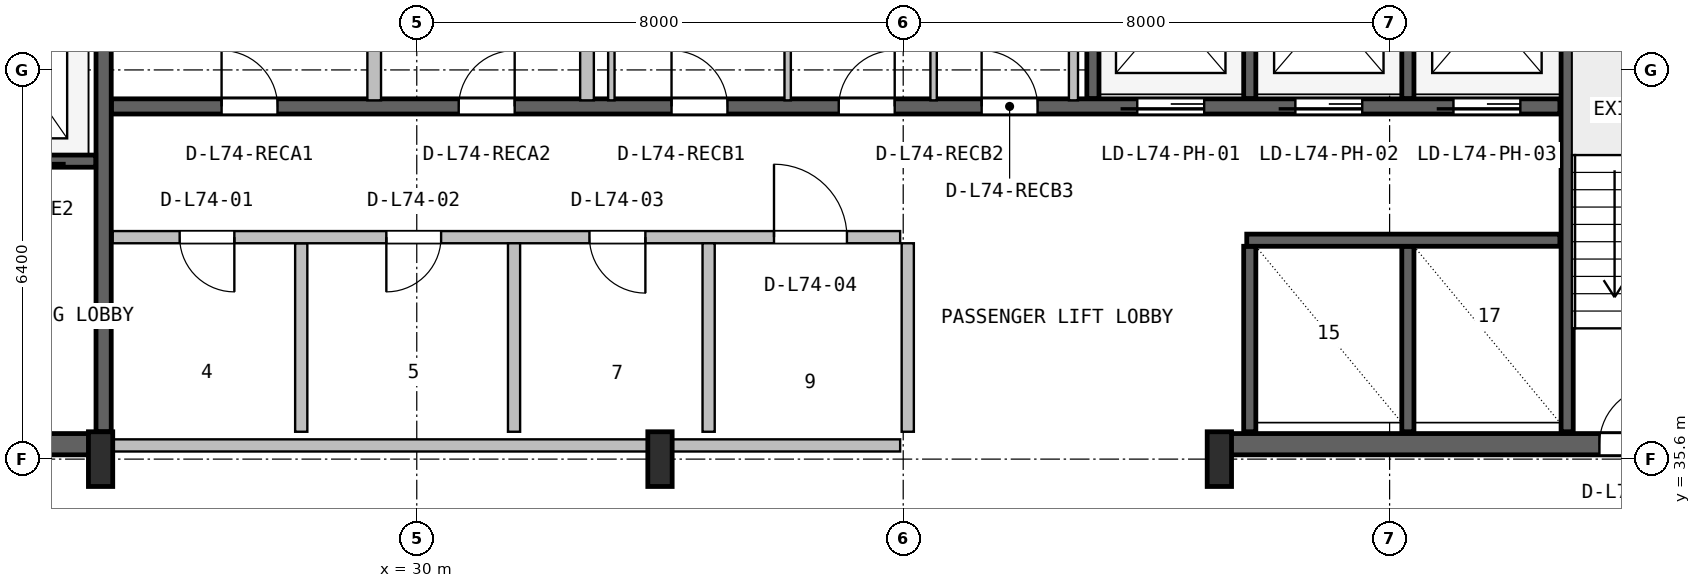
"""IFC4 building model, lengths in metres.
Left out: names, types, materials, properties, quantities, classifications, styles, units other than length and angle.
Written with IfcOpenShell. Run it as: python <this file> out.ifc"""

import sys

from ifc_helpers import new_model, si_unit, direction, frame, frame_2d, origin, origin_2d, place, context, subcontext, project, spatial, rectangle, i_section, extrude, source, transform, mapped, element, fill, save


model = new_model("IFC4")
c1 = context("Model", 3, precision=1e-05, world=origin(), true_north=direction((0.0, 1.0)))
c2 = subcontext(c1, "Body", "Model", "MODEL_VIEW")
j1 = project(units=[si_unit("LENGTHUNIT", "METRE"), si_unit("PLANEANGLEUNIT", "RADIAN")], contexts=[c1])
p1 = place(None, origin())
s1 = spatial("IfcSite", under=j1, at=p1, CompositionType="ELEMENT")
p2 = place(p1, origin())
s2 = spatial("IfcBuilding", under=s1, at=p2, CompositionType="ELEMENT")
p3 = place(p2, frame((0.0, 0.0, 296.4)))
s3 = spatial("IfcBuildingStorey", under=s2, at=p3, CompositionType="ELEMENT", Elevation=296.4)
p4 = place(p3, frame((15.67, 35.845, 0.0), z_axis=(0.0, 0.0, 1.0), x_axis=(1.0, 0.0, 0.0)))
e1 = element("IfcWall", 1, at=p4, inside=s3, PredefinedType="SHEAR", context=c2, shape_type="SweptSolid", body=[
    extrude(rectangle(XDim=9.13, YDim=0.35, at=frame_2d((4.565, 0.0))), origin(), (0.0, 0.0, 1.0), 3.52),
])
p5 = place(p4, frame((5.4, 0.0, 0.0)))
e2 = element("IfcOpeningElement", 2, at=p5, cuts=e1, PredefinedType="OPENING", context=c2, shape_type="SweptSolid", body=[
    extrude(rectangle(XDim=1.0, YDim=2.1, at=frame_2d((0.5, 1.05))), frame((0.0, 0.185, 0.0), z_axis=(0.0, -1.0, 0.0), x_axis=(1.0, 0.0, 0.0)), (0.0, 0.0, 1.0), 0.37),
])
p6 = place(p3, frame((43.2, 35.845, 0.0), z_axis=(0.0, 0.0, 1.0), x_axis=(1.0, 0.0, 0.0)))
e3 = element("IfcWall", 3, at=p6, inside=s3, PredefinedType="SHEAR", context=c2, shape_type="SweptSolid", body=[
    extrude(rectangle(XDim=9.13, YDim=0.35, at=frame_2d((4.565, 0.0))), origin(), (0.0, 0.0, 1.0), 3.52),
])
p7 = place(p6, frame((6.25, 0.0, 0.0)))
e4 = element("IfcOpeningElement", 4, at=p7, cuts=e3, PredefinedType="OPENING", context=c2, shape_type="SweptSolid", body=[
    extrude(rectangle(XDim=0.95, YDim=2.1, at=frame_2d((0.475, 1.05))), frame((0.0, 0.185, 0.0), z_axis=(0.0, -1.0, 0.0), x_axis=(1.0, 0.0, 0.0)), (0.0, 0.0, 1.0), 0.37),
])
m1 = source(origin(), c2, "Body", "SweptSolid", [
    extrude(i_section(OverallWidth=0.4, OverallDepth=0.9, WebThickness=0.016, FlangeThickness=0.028, FilletRadius=0.016, at=origin_2d()), origin(), (0.0, 0.0, 1.0), 3.8),
])
for number, where, z_axis, x_axis in (
    (5, (24.8, 35.6, 0.0), (0.0, 0.0, 1.0), (1.0, 0.0, 0.0)),
    (6, (34.0, 35.6, 0.0), (0.0, 0.0, 1.0), (1.0, 0.0, 0.0)),
    (7, (43.2, 35.6, 0.0), (0.0, 0.0, 1.0), (1.0, 0.0, 0.0)),
):
    element("IfcColumn", number, at=place(p3, frame(where, z_axis=z_axis, x_axis=x_axis)), inside=s3, PredefinedType="COLUMN", context=c2, shape_type="MappedRepresentation", body=[
        mapped(m1, transform((0.0, 0.0, 0.0), x_axis=(1.0, 0.0, 0.0), y_axis=(0.0, 1.0, 0.0), z_axis=(0.0, 0.0, 1.0), scale=1.0)),
    ])
p8 = place(p3, frame((24.85, 36.05, 0.0), z_axis=(0.0, 0.0, 1.0), x_axis=(0.0, 1.0, 0.0)))
e8 = element("IfcWall", 8, at=p8, inside=s3, PredefinedType="SHEAR", context=c2, shape_type="SweptSolid", body=[
    extrude(rectangle(XDim=10.45, YDim=0.25, at=frame_2d((5.225, 0.0))), origin(), (0.0, 0.0, 1.0), 3.52),
])
p9 = place(p3, frame((19.2, 40.5, 0.0), z_axis=(0.0, 0.0, 1.0), x_axis=(1.0, 0.0, 0.0)))
e9 = element("IfcWall", 9, at=p9, inside=s3, PredefinedType="SHEAR", context=c2, shape_type="SweptSolid", body=[
    extrude(rectangle(XDim=5.52, YDim=0.2, at=frame_2d((2.76, 0.0))), origin(), (0.0, 0.0, 1.0), 3.52),
])
p10 = place(p9, frame((1.05, 0.0, 0.0)))
e10 = element("IfcOpeningElement", 10, at=p10, cuts=e9, PredefinedType="OPENING", context=c2, shape_type="SweptSolid", body=[
    extrude(rectangle(XDim=1.1, YDim=2.18, at=frame_2d((0.55, 1.09))), frame((0.0, 0.11, 0.0), z_axis=(0.0, -1.0, 0.0), x_axis=(1.0, 0.0, 0.0)), (0.0, 0.0, 1.0), 0.22),
])
p11 = place(p9, frame((3.65, 0.0, 0.0)))
e11 = element("IfcOpeningElement", 11, at=p11, cuts=e9, PredefinedType="OPENING", context=c2, shape_type="SweptSolid", body=[
    extrude(rectangle(XDim=1.1, YDim=2.18, at=frame_2d((0.55, 1.09))), frame((0.0, 0.11, 0.0), z_axis=(0.0, -1.0, 0.0), x_axis=(1.0, 0.0, 0.0)), (0.0, 0.0, 1.0), 0.22),
])
p12 = place(p3, frame((48.92, 36.05, 0.0), z_axis=(0.0, 0.0, 1.0), x_axis=(0.0, 1.0, 0.0)))
e12 = element("IfcWall", 12, at=p12, inside=s3, PredefinedType="SHEAR", context=c2, shape_type="SweptSolid", body=[
    extrude(rectangle(XDim=10.5, YDim=0.2, at=frame_2d((5.25, 0.0))), origin(), (0.0, 0.0, 1.0), 3.52),
])
p13 = place(p3, frame((24.98, 41.4, 0.0), z_axis=(0.0, 0.0, 1.0), x_axis=(1.0, 0.0, 0.0)))
e13 = element("IfcWall", 13, at=p13, inside=s3, PredefinedType="SHEAR", context=c2, shape_type="SweptSolid", body=[
    extrude(rectangle(XDim=23.82, YDim=0.25, at=frame_2d((11.91, 0.0))), origin(), (0.0, 0.0, 1.0), 3.52),
])
p14 = place(p13, frame((16.87, 0.0, 0.0)))
e14 = element("IfcOpeningElement", 14, at=p14, cuts=e13, PredefinedType="OPENING", context=c2, shape_type="SweptSolid", body=[
    extrude(rectangle(XDim=1.1, YDim=2.18, at=frame_2d((0.55, 1.09))), frame((0.0, 0.135, 0.0), z_axis=(0.0, -1.0, 0.0), x_axis=(1.0, 0.0, 0.0)), (0.0, 0.0, 1.0), 0.27),
])
p15 = place(p13, frame((19.47, 0.0, 0.0)))
e15 = element("IfcOpeningElement", 15, at=p15, cuts=e13, PredefinedType="OPENING", context=c2, shape_type="SweptSolid", body=[
    extrude(rectangle(XDim=1.1, YDim=2.18, at=frame_2d((0.55, 1.09))), frame((0.0, 0.135, 0.0), z_axis=(0.0, -1.0, 0.0), x_axis=(1.0, 0.0, 0.0)), (0.0, 0.0, 1.0), 0.27),
])
p16 = place(p13, frame((22.07, 0.0, 0.0)))
e16 = element("IfcOpeningElement", 16, at=p16, cuts=e13, PredefinedType="OPENING", context=c2, shape_type="SweptSolid", body=[
    extrude(rectangle(XDim=1.1, YDim=2.18, at=frame_2d((0.55, 1.09))), frame((0.0, 0.135, 0.0), z_axis=(0.0, -1.0, 0.0), x_axis=(1.0, 0.0, 0.0)), (0.0, 0.0, 1.0), 0.27),
])
p17 = place(p13, frame((1.81, 0.0, 0.0)))
e17 = element("IfcOpeningElement", 17, at=p17, cuts=e13, PredefinedType="OPENING", context=c2, shape_type="SweptSolid", body=[
    extrude(rectangle(XDim=0.92, YDim=2.08, at=frame_2d((0.46, 1.04))), frame((0.0, 0.135, 0.0), z_axis=(0.0, -1.0, 0.0), x_axis=(1.0, 0.0, 0.0)), (0.0, 0.0, 1.0), 0.27),
])
p18 = place(p13, frame((5.71, 0.0, 0.0)))
e18 = element("IfcOpeningElement", 18, at=p18, cuts=e13, PredefinedType="OPENING", context=c2, shape_type="SweptSolid", body=[
    extrude(rectangle(XDim=0.92, YDim=2.08, at=frame_2d((0.46, 1.04))), frame((0.0, 0.135, 0.0), z_axis=(0.0, -1.0, 0.0), x_axis=(1.0, 0.0, 0.0)), (0.0, 0.0, 1.0), 0.27),
])
p19 = place(p13, frame((9.21, 0.0, 0.0)))
e19 = element("IfcOpeningElement", 19, at=p19, cuts=e13, PredefinedType="OPENING", context=c2, shape_type="SweptSolid", body=[
    extrude(rectangle(XDim=0.92, YDim=2.08, at=frame_2d((0.46, 1.04))), frame((0.0, 0.135, 0.0), z_axis=(0.0, -1.0, 0.0), x_axis=(1.0, 0.0, 0.0)), (0.0, 0.0, 1.0), 0.27),
])
p20 = place(p13, frame((11.96, 0.0, 0.0)))
e20 = element("IfcOpeningElement", 20, at=p20, cuts=e13, PredefinedType="OPENING", context=c2, shape_type="SweptSolid", body=[
    extrude(rectangle(XDim=0.92, YDim=2.08, at=frame_2d((0.46, 1.04))), frame((0.0, 0.135, 0.0), z_axis=(0.0, -1.0, 0.0), x_axis=(1.0, 0.0, 0.0)), (0.0, 0.0, 1.0), 0.27),
])
p21 = place(p13, frame((14.31, 0.0, 0.0)))
e21 = element("IfcOpeningElement", 21, at=p21, cuts=e13, PredefinedType="OPENING", context=c2, shape_type="SweptSolid", body=[
    extrude(rectangle(XDim=0.92, YDim=2.08, at=frame_2d((0.46, 1.04))), frame((0.0, 0.135, 0.0), z_axis=(0.0, -1.0, 0.0), x_axis=(1.0, 0.0, 0.0)), (0.0, 0.0, 1.0), 0.27),
])
p22 = place(p3, frame((41.12, 41.53, 0.0), z_axis=(0.0, 0.0, 1.0), x_axis=(0.0, 1.0, 0.0)))
e22 = element("IfcWall", 22, at=p22, inside=s3, PredefinedType="SHEAR", context=c2, shape_type="SweptSolid", body=[
    extrude(rectangle(XDim=5.02, YDim=0.2, at=frame_2d((2.51, 0.0))), origin(), (0.0, 0.0, 1.0), 3.52),
])
for number, where, z_axis, x_axis in (
    (23, (43.7, 41.53, 0.0), (0.0, 0.0, 1.0), (0.0, 1.0, 0.0)),
    (24, (46.3, 41.53, 0.0), (0.0, 0.0, 1.0), (0.0, 1.0, 0.0)),
):
    element("IfcWall", number, at=place(p3, frame(where, z_axis=z_axis, x_axis=x_axis)), inside=s3, PredefinedType="SHEAR", context=c2, shape_type="SweptSolid", body=[
        extrude(rectangle(XDim=2.87, YDim=0.2, at=frame_2d((1.435, 0.0))), origin(), (0.0, 0.0, 1.0), 3.52),
    ])
for number, where, z_axis, x_axis in (
    (25, (43.7, 36.05, 0.0), (0.0, 0.0, 1.0), (0.0, 1.0, 0.0)),
    (26, (46.3, 36.05, 0.0), (0.0, 0.0, 1.0), (0.0, 1.0, 0.0)),
):
    element("IfcWall", number, at=place(p3, frame(where, z_axis=z_axis, x_axis=x_axis)), inside=s3, PredefinedType="SHEAR", context=c2, shape_type="SweptSolid", body=[
        extrude(rectangle(XDim=3.05, YDim=0.2, at=frame_2d((1.525, 0.0))), origin(), (0.0, 0.0, 1.0), 3.52),
    ])
p23 = place(p3, frame((43.65, 39.2, 0.0), z_axis=(0.0, 0.0, 1.0), x_axis=(1.0, 0.0, 0.0)))
e27 = element("IfcWall", 27, at=p23, inside=s3, PredefinedType="SHEAR", context=c2, shape_type="SweptSolid", body=[
    extrude(rectangle(XDim=5.15, YDim=0.2, at=frame_2d((2.575, 0.0))), origin(), (0.0, 0.0, 1.0), 3.52),
])
p24 = place(p3, frame((25.0, 35.825, 0.0), z_axis=(0.0, 0.0, 1.0), x_axis=(1.0, 0.0, 0.0)))
e28 = element("IfcWall", 28, at=p24, inside=s3, PredefinedType="SOLIDWALL", context=c2, shape_type="SweptSolid", body=[
    extrude(rectangle(XDim=12.95, YDim=0.2, at=frame_2d((6.475, 0.0))), origin(), (0.0, 0.0, 1.0), 2.545),
])
p25 = place(p3, frame((28.1, 36.05, 0.0), z_axis=(0.0, 0.0, 1.0), x_axis=(0.0, 1.0, 0.0)))
e29 = element("IfcWall", 29, at=p25, inside=s3, PredefinedType="PLUMBINGWALL", context=c2, shape_type="SweptSolid", body=[
    extrude(rectangle(XDim=3.1, YDim=0.2, at=frame_2d((1.55, 0.0))), origin(), (0.0, 0.0, 1.0), 3.5),
])
p26 = place(p3, frame((25.0, 39.25, 0.0), z_axis=(0.0, 0.0, 1.0), x_axis=(1.0, 0.0, 0.0)))
e30 = element("IfcWall", 30, at=p26, inside=s3, PredefinedType="SOLIDWALL", context=c2, shape_type="SweptSolid", body=[
    extrude(rectangle(XDim=12.95, YDim=0.2, at=frame_2d((6.475, 0.0))), origin(), (0.0, 0.0, 1.0), 3.5),
])
p27 = place(p26, frame((1.1, 0.0, 0.0)))
e31 = element("IfcOpeningElement", 31, at=p27, cuts=e30, PredefinedType="OPENING", context=c2, shape_type="SweptSolid", body=[
    extrude(rectangle(XDim=0.9, YDim=2.06, at=frame_2d((0.45, 1.03))), frame((0.0, 0.11, 0.0), z_axis=(0.0, -1.0, 0.0), x_axis=(1.0, 0.0, 0.0)), (0.0, 0.0, 1.0), 0.22),
])
p28 = place(p26, frame((4.5, 0.0, 0.0)))
e32 = element("IfcOpeningElement", 32, at=p28, cuts=e30, PredefinedType="OPENING", context=c2, shape_type="SweptSolid", body=[
    extrude(rectangle(XDim=0.9, YDim=2.06, at=frame_2d((0.45, 1.03))), frame((0.0, 0.11, 0.0), z_axis=(0.0, -1.0, 0.0), x_axis=(1.0, 0.0, 0.0)), (0.0, 0.0, 1.0), 0.22),
])
p29 = place(p26, frame((7.84, 0.0, 0.0)))
e33 = element("IfcOpeningElement", 33, at=p29, cuts=e30, PredefinedType="OPENING", context=c2, shape_type="SweptSolid", body=[
    extrude(rectangle(XDim=0.92, YDim=2.08, at=frame_2d((0.46, 1.04))), frame((0.0, 0.11, 0.0), z_axis=(0.0, -1.0, 0.0), x_axis=(1.0, 0.0, 0.0)), (0.0, 0.0, 1.0), 0.22),
])
p30 = place(p26, frame((10.875, 0.0, 0.0)))
e34 = element("IfcOpeningElement", 34, at=p30, cuts=e30, PredefinedType="OPENING", context=c2, shape_type="SweptSolid", body=[
    extrude(rectangle(XDim=1.2, YDim=2.1, at=frame_2d((0.6, 1.05))), frame((0.0, 0.11, 0.0), z_axis=(0.0, -1.0, 0.0), x_axis=(1.0, 0.0, 0.0)), (0.0, 0.0, 1.0), 0.22),
])
p31 = place(p3, frame((31.6, 36.05, 0.0), z_axis=(0.0, 0.0, 1.0), x_axis=(0.0, 1.0, 0.0)))
e35 = element("IfcWall", 35, at=p31, inside=s3, PredefinedType="PLUMBINGWALL", context=c2, shape_type="SweptSolid", body=[
    extrude(rectangle(XDim=3.1, YDim=0.2, at=frame_2d((1.55, 0.0))), origin(), (0.0, 0.0, 1.0), 3.5),
])
for number, where, z_axis, x_axis in (
    (36, (34.8, 36.05, 0.0), (0.0, 0.0, 1.0), (0.0, 1.0, 0.0)),
    (37, (38.075, 36.05, 0.0), (0.0, 0.0, 1.0), (0.0, 1.0, 0.0)),
):
    element("IfcWall", number, at=place(p3, frame(where, z_axis=z_axis, x_axis=x_axis)), inside=s3, PredefinedType="SOLIDWALL", context=c2, shape_type="SweptSolid", body=[
        extrude(rectangle(XDim=3.1, YDim=0.2, at=frame_2d((1.55, 0.0))), origin(), (0.0, 0.0, 1.0), 3.5),
    ])
p32 = place(p3, frame((29.3, 41.5, 0.0), z_axis=(0.0, 0.0, 1.0), x_axis=(0.0, 1.0, 0.0)))
e38 = element("IfcWall", 38, at=p32, inside=s3, PredefinedType="PARTITIONING", context=c2, shape_type="SweptSolid", body=[
    extrude(rectangle(XDim=2.288, YDim=0.225, at=frame_2d((1.144, 0.0))), origin(), (0.0, 0.0, 1.0), 3.5),
])
p33 = place(p3, frame((32.8, 41.5, 0.0), z_axis=(0.0, 0.0, 1.0), x_axis=(0.0, 1.0, 0.0)))
e39 = element("IfcWall", 39, at=p33, inside=s3, PredefinedType="PARTITIONING", context=c2, shape_type="SweptSolid", body=[
    extrude(rectangle(XDim=5.02, YDim=0.225, at=frame_2d((2.51, 0.0))), origin(), (0.0, 0.0, 1.0), 3.5),
])
for number, where, z_axis, x_axis in (
    (40, (36.1, 41.5, 0.0), (0.0, 0.0, 1.0), (0.0, 1.0, 0.0)),
    (41, (33.2, 41.5, 0.0), (0.0, 0.0, 1.0), (0.0, 1.0, 0.0)),
    (42, (38.5, 41.5, 0.0), (0.0, 0.0, 1.0), (0.0, 1.0, 0.0)),
):
    element("IfcWall", number, at=place(p3, frame(where, z_axis=z_axis, x_axis=x_axis)), inside=s3, PredefinedType="PARTITIONING", context=c2, shape_type="SweptSolid", body=[
        extrude(rectangle(XDim=5.02, YDim=0.105, at=frame_2d((2.51, 0.0))), origin(), (0.0, 0.0, 1.0), 3.5),
    ])
p34 = place(p3, frame((40.8, 41.5, 0.0), z_axis=(0.0, 0.0, 1.0), x_axis=(0.0, 1.0, 0.0)))
e43 = element("IfcWall", 43, at=p34, inside=s3, PredefinedType="PARTITIONING", context=c2, shape_type="SweptSolid", body=[
    extrude(rectangle(XDim=5.02, YDim=0.15, at=frame_2d((2.51, 0.0))), origin(), (0.0, 0.0, 1.0), 3.5),
])
m2 = source(origin(), c2, "Body", "SweptSolid", [
    extrude(rectangle(XDim=0.95, YDim=2.1, at=frame_2d((0.475, 1.05))), frame((0.0, 0.025, 0.0), z_axis=(0.0, -1.0, 0.0), x_axis=(1.0, 0.0, 0.0)), (0.0, 0.0, 1.0), 0.05),
])
p35 = place(p7, origin())
e44 = element("IfcDoor", 44, at=p35, inside=s3, OperationType="SINGLE_SWING_RIGHT", PredefinedType="DOOR", context=c2, shape_type="MappedRepresentation", body=[
    mapped(m2, transform((0.0, 0.0, 0.0), x_axis=(1.0, 0.0, 0.0), y_axis=(0.0, 1.0, 0.0), z_axis=(0.0, 0.0, 1.0), scale=1.0)),
])
fill(e4, e44)
m3 = source(origin(), c2, "Body", "SweptSolid", [
    extrude(rectangle(XDim=1.1, YDim=2.18, at=frame_2d((0.55, 1.09))), frame((0.0, 0.025, 0.0), z_axis=(0.0, -1.0, 0.0), x_axis=(1.0, 0.0, 0.0)), (0.0, 0.0, 1.0), 0.05),
])
p36 = place(p14, frame((1.1, 0.0, 0.0), z_axis=(0.0, 0.0, 1.0), x_axis=(-1.0, 0.0, 0.0)))
e45 = element("IfcDoor", 45, at=p36, inside=s3, OperationType="SLIDING_TO_LEFT", PredefinedType="DOOR", context=c2, shape_type="MappedRepresentation", body=[
    mapped(m3, transform((0.0, 0.0, 0.0), x_axis=(1.0, 0.0, 0.0), y_axis=(0.0, 1.0, 0.0), z_axis=(0.0, 0.0, 1.0), scale=1.0)),
])
fill(e14, e45)
p37 = place(p15, frame((1.1, 0.0, 0.0), z_axis=(0.0, 0.0, 1.0), x_axis=(-1.0, 0.0, 0.0)))
e46 = element("IfcDoor", 46, at=p37, inside=s3, OperationType="SLIDING_TO_LEFT", PredefinedType="DOOR", context=c2, shape_type="MappedRepresentation", body=[
    mapped(m3, transform((0.0, 0.0, 0.0), x_axis=(1.0, 0.0, 0.0), y_axis=(0.0, 1.0, 0.0), z_axis=(0.0, 0.0, 1.0), scale=1.0)),
])
fill(e15, e46)
p38 = place(p16, frame((1.1, 0.0, 0.0), z_axis=(0.0, 0.0, 1.0), x_axis=(-1.0, 0.0, 0.0)))
e47 = element("IfcDoor", 47, at=p38, inside=s3, OperationType="SLIDING_TO_LEFT", PredefinedType="DOOR", context=c2, shape_type="MappedRepresentation", body=[
    mapped(m3, transform((0.0, 0.0, 0.0), x_axis=(1.0, 0.0, 0.0), y_axis=(0.0, 1.0, 0.0), z_axis=(0.0, 0.0, 1.0), scale=1.0)),
])
fill(e16, e47)
m4 = source(origin(), c2, "Body", "SweptSolid", [
    extrude(rectangle(XDim=0.92, YDim=2.08, at=frame_2d((0.46, 1.04))), frame((0.0, 0.025, 0.0), z_axis=(0.0, -1.0, 0.0), x_axis=(1.0, 0.0, 0.0)), (0.0, 0.0, 1.0), 0.05),
])
p39 = place(p17, origin())
e48 = element("IfcDoor", 48, at=p39, inside=s3, OperationType="SINGLE_SWING_LEFT", PredefinedType="DOOR", context=c2, shape_type="MappedRepresentation", body=[
    mapped(m4, transform((0.0, 0.0, 0.0), x_axis=(1.0, 0.0, 0.0), y_axis=(0.0, 1.0, 0.0), z_axis=(0.0, 0.0, 1.0), scale=1.0)),
])
fill(e17, e48)
p40 = place(p18, origin())
e49 = element("IfcDoor", 49, at=p40, inside=s3, OperationType="SINGLE_SWING_RIGHT", PredefinedType="DOOR", context=c2, shape_type="MappedRepresentation", body=[
    mapped(m4, transform((0.0, 0.0, 0.0), x_axis=(1.0, 0.0, 0.0), y_axis=(0.0, 1.0, 0.0), z_axis=(0.0, 0.0, 1.0), scale=1.0)),
])
fill(e18, e49)
p41 = place(p19, origin())
e50 = element("IfcDoor", 50, at=p41, inside=s3, OperationType="SINGLE_SWING_LEFT", PredefinedType="DOOR", context=c2, shape_type="MappedRepresentation", body=[
    mapped(m4, transform((0.0, 0.0, 0.0), x_axis=(1.0, 0.0, 0.0), y_axis=(0.0, 1.0, 0.0), z_axis=(0.0, 0.0, 1.0), scale=1.0)),
])
fill(e19, e50)
p42 = place(p20, origin())
e51 = element("IfcDoor", 51, at=p42, inside=s3, OperationType="SINGLE_SWING_RIGHT", PredefinedType="DOOR", context=c2, shape_type="MappedRepresentation", body=[
    mapped(m4, transform((0.0, 0.0, 0.0), x_axis=(1.0, 0.0, 0.0), y_axis=(0.0, 1.0, 0.0), z_axis=(0.0, 0.0, 1.0), scale=1.0)),
])
fill(e20, e51)
p43 = place(p21, origin())
e52 = element("IfcDoor", 52, at=p43, inside=s3, OperationType="SINGLE_SWING_LEFT", PredefinedType="DOOR", context=c2, shape_type="MappedRepresentation", body=[
    mapped(m4, transform((0.0, 0.0, 0.0), x_axis=(1.0, 0.0, 0.0), y_axis=(0.0, 1.0, 0.0), z_axis=(0.0, 0.0, 1.0), scale=1.0)),
])
fill(e21, e52)
m5 = source(origin(), c2, "Body", "SweptSolid", [
    extrude(rectangle(XDim=0.9, YDim=2.06, at=frame_2d((0.45, 1.03))), frame((0.0, 0.025, 0.0), z_axis=(0.0, -1.0, 0.0), x_axis=(1.0, 0.0, 0.0)), (0.0, 0.0, 1.0), 0.05),
])
p44 = place(p27, frame((0.9, 0.0, 0.0), z_axis=(0.0, 0.0, 1.0), x_axis=(-1.0, 0.0, 0.0)))
e53 = element("IfcDoor", 53, at=p44, inside=s3, OperationType="SINGLE_SWING_RIGHT", PredefinedType="DOOR", context=c2, shape_type="MappedRepresentation", body=[
    mapped(m5, transform((0.0, 0.0, 0.0), x_axis=(1.0, 0.0, 0.0), y_axis=(0.0, 1.0, 0.0), z_axis=(0.0, 0.0, 1.0), scale=1.0)),
])
fill(e31, e53)
p45 = place(p28, frame((0.9, 0.0, 0.0), z_axis=(0.0, 0.0, 1.0), x_axis=(-1.0, 0.0, 0.0)))
e54 = element("IfcDoor", 54, at=p45, inside=s3, OperationType="SINGLE_SWING_LEFT", PredefinedType="DOOR", context=c2, shape_type="MappedRepresentation", body=[
    mapped(m5, transform((0.0, 0.0, 0.0), x_axis=(1.0, 0.0, 0.0), y_axis=(0.0, 1.0, 0.0), z_axis=(0.0, 0.0, 1.0), scale=1.0)),
])
fill(e32, e54)
p46 = place(p29, frame((0.92, 0.0, 0.0), z_axis=(0.0, 0.0, 1.0), x_axis=(-1.0, 0.0, 0.0)))
e55 = element("IfcDoor", 55, at=p46, inside=s3, OperationType="SINGLE_SWING_RIGHT", PredefinedType="DOOR", context=c2, shape_type="MappedRepresentation", body=[
    mapped(m4, transform((0.0, 0.0, 0.0), x_axis=(1.0, 0.0, 0.0), y_axis=(0.0, 1.0, 0.0), z_axis=(0.0, 0.0, 1.0), scale=1.0)),
])
fill(e33, e55)
m6 = source(origin(), c2, "Body", "SweptSolid", [
    extrude(rectangle(XDim=1.2, YDim=2.1, at=frame_2d((0.6, 1.05))), frame((0.0, 0.025, 0.0), z_axis=(0.0, -1.0, 0.0), x_axis=(1.0, 0.0, 0.0)), (0.0, 0.0, 1.0), 0.05),
])
p47 = place(p30, origin())
e56 = element("IfcDoor", 56, at=p47, inside=s3, OperationType="SINGLE_SWING_LEFT", PredefinedType="DOOR", context=c2, shape_type="MappedRepresentation", body=[
    mapped(m6, transform((0.0, 0.0, 0.0), x_axis=(1.0, 0.0, 0.0), y_axis=(0.0, 1.0, 0.0), z_axis=(0.0, 0.0, 1.0), scale=1.0)),
])
fill(e34, e56)
save(model, sys.argv[1])
